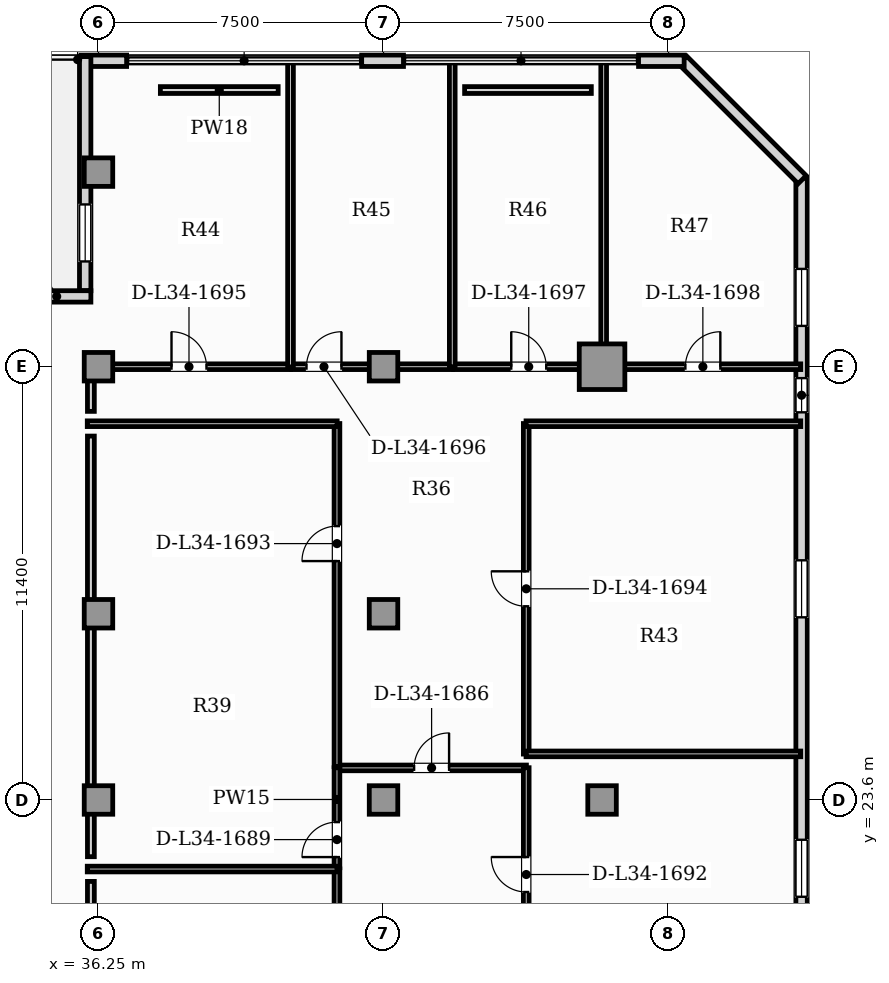
"""IFC4 building model, lengths in metres.
Left out: names, types, materials, properties, quantities, classifications, styles, units other than length and angle.
Written with IfcOpenShell. Run it as: python <this file> out.ifc"""

import sys

from ifc_helpers import new_model, si_unit, direction, frame, frame_2d, origin, origin_2d, place, context, subcontext, project, spatial, rectangle, hollow_rectangle, extrude, element, fill, save


model = new_model("IFC4")
c1 = context("Model", 3, precision=1e-05, world=origin(), true_north=direction((0.0, 1.0)))
c2 = subcontext(c1, "Body", "Model", "MODEL_VIEW")
j1 = project(units=[si_unit("LENGTHUNIT", "METRE"), si_unit("PLANEANGLEUNIT", "RADIAN")], contexts=[c1])
p1 = place(None, origin())
s1 = spatial("IfcSite", under=j1, at=p1, CompositionType="ELEMENT")
p2 = place(p1, origin())
s2 = spatial("IfcBuilding", under=s1, at=p2, CompositionType="ELEMENT")
p3 = place(p2, frame((0.0, 0.0, 140.15)))
s3 = spatial("IfcBuildingStorey", under=s2, at=p3, CompositionType="ELEMENT", Elevation=140.15)
p4 = place(p3, frame((49.5, 35.0, 0.0), z_axis=(0.0, 0.0, 1.0), x_axis=(1.0, 0.0, 0.0)))
e1 = element("IfcColumn", 1, at=p4, inside=s3, PredefinedType="USERDEFINED", context=c2, shape_type="SweptSolid", body=[
    extrude(hollow_rectangle(XDim=1.2, YDim=1.2, WallThickness=0.07, at=origin_2d()), origin(), (0.0, 0.0, 1.0), 5.05),
])
for number, where, z_axis, x_axis in (
    (2, (36.25, 23.6, 0.0), (0.0, 0.0, 1.0), (1.0, 0.0, 0.0)),
    (3, (43.75, 23.6, 0.0), (0.0, 0.0, 1.0), (1.0, 0.0, 0.0)),
    (4, (49.5, 23.6, 0.0), (0.0, 0.0, 1.0), (1.0, 0.0, 0.0)),
    (5, (36.25, 28.5, 0.0), (0.0, 0.0, 1.0), (1.0, 0.0, 0.0)),
    (6, (43.75, 28.5, 0.0), (0.0, 0.0, 1.0), (1.0, 0.0, 0.0)),
    (7, (36.25, 40.12, 0.0), (0.0, 0.0, 1.0), (1.0, 0.0, 0.0)),
    (8, (36.25, 35.0, 0.0), (0.0, 0.0, 1.0), (1.0, 0.0, 0.0)),
    (9, (43.75, 35.0, 0.0), (0.0, 0.0, 1.0), (1.0, 0.0, 0.0)),
):
    element("IfcColumn", number, at=place(p3, frame(where, z_axis=z_axis, x_axis=x_axis)), inside=s3, PredefinedType="COLUMN", context=c2, shape_type="SweptSolid", body=[
        extrude(rectangle(XDim=0.75, YDim=0.75, at=origin_2d()), origin(), (0.0, 0.0, 1.0), 5.05),
    ])
p5 = place(p3, frame((54.75, 3.24, 0.0), z_axis=(0.0, 0.0, 1.0), x_axis=(0.0, 1.0, 0.0)))
e10 = element("IfcWall", 10, at=p5, inside=s3, PredefinedType="SOLIDWALL", context=c2, shape_type="SweptSolid", body=[
    extrude(rectangle(XDim=36.72, YDim=0.3, at=frame_2d((18.36, 0.0))), origin(), (0.0, 0.0, 1.0), 4.83),
])
p6 = place(p5, frame((30.56, 0.0, 0.95)))
e11 = element("IfcOpeningElement", 11, at=p6, cuts=e10, PredefinedType="OPENING", context=c2, shape_type="SweptSolid", body=[
    extrude(rectangle(XDim=0.9, YDim=1.5, at=frame_2d((0.45, 0.75))), frame((0.0, 0.16, 0.0), z_axis=(0.0, -1.0, 0.0), x_axis=(1.0, 0.0, 0.0)), (0.0, 0.0, 1.0), 0.32),
])
p7 = place(p5, frame((10.095, 0.0, 0.95)))
e12 = element("IfcOpeningElement", 12, at=p7, cuts=e10, PredefinedType="OPENING", context=c2, shape_type="SweptSolid", body=[
    extrude(rectangle(XDim=0.9, YDim=1.5, at=frame_2d((0.45, 0.75))), frame((0.0, 0.16, 0.0), z_axis=(0.0, -1.0, 0.0), x_axis=(1.0, 0.0, 0.0)), (0.0, 0.0, 1.0), 0.32),
])
p8 = place(p5, frame((12.757, 0.0, 0.9)))
e13 = element("IfcOpeningElement", 13, at=p8, cuts=e10, PredefinedType="OPENING", context=c2, shape_type="SweptSolid", body=[
    extrude(rectangle(XDim=1.5, YDim=1.95, at=frame_2d((0.75, 0.975))), frame((0.0, 0.16, 0.0), z_axis=(0.0, -1.0, 0.0), x_axis=(1.0, 0.0, 0.0)), (0.0, 0.0, 1.0), 0.32),
])
p9 = place(p5, frame((17.813, 0.0, 0.9)))
e14 = element("IfcOpeningElement", 14, at=p9, cuts=e10, PredefinedType="OPENING", context=c2, shape_type="SweptSolid", body=[
    extrude(rectangle(XDim=1.5, YDim=1.95, at=frame_2d((0.75, 0.975))), frame((0.0, 0.16, 0.0), z_axis=(0.0, -1.0, 0.0), x_axis=(1.0, 0.0, 0.0)), (0.0, 0.0, 1.0), 0.32),
])
p10 = place(p5, frame((25.167, 0.0, 0.9)))
e15 = element("IfcOpeningElement", 15, at=p10, cuts=e10, PredefinedType="OPENING", context=c2, shape_type="SweptSolid", body=[
    extrude(rectangle(XDim=1.5, YDim=1.95, at=frame_2d((0.75, 0.975))), frame((0.0, 0.16, 0.0), z_axis=(0.0, -1.0, 0.0), x_axis=(1.0, 0.0, 0.0)), (0.0, 0.0, 1.0), 0.32),
])
p11 = place(p5, frame((32.834, 0.0, 0.9)))
e16 = element("IfcOpeningElement", 16, at=p11, cuts=e10, PredefinedType="OPENING", context=c2, shape_type="SweptSolid", body=[
    extrude(rectangle(XDim=1.5, YDim=1.95, at=frame_2d((0.75, 0.975))), frame((0.0, 0.16, 0.0), z_axis=(0.0, -1.0, 0.0), x_axis=(1.0, 0.0, 0.0)), (0.0, 0.0, 1.0), 0.32),
])
p12 = place(p3, frame((54.766, 39.922, 0.0), z_axis=(0.0, 0.0, 1.0), x_axis=(-0.707079321262, 0.707134240044, 0.0)))
e17 = element("IfcWall", 17, at=p12, inside=s3, PredefinedType="SOLIDWALL", context=c2, shape_type="SweptSolid", body=[
    extrude(rectangle(XDim=4.446, YDim=0.3, at=frame_2d((2.223, 0.0))), origin(), (0.0, 0.0, 1.0), 4.83),
])
p13 = place(p3, frame((51.66, 43.05, 0.0), z_axis=(0.0, 0.0, 1.0), x_axis=(-1.0, 0.0, 0.0)))
e18 = element("IfcWall", 18, at=p13, inside=s3, PredefinedType="SOLIDWALL", context=c2, shape_type="SweptSolid", body=[
    extrude(rectangle(XDim=1.2, YDim=0.3, at=frame_2d((0.6, 0.0))), origin(), (0.0, 0.0, 1.0), 4.83),
])
p14 = place(p3, frame((44.275, 43.05, 0.0), z_axis=(0.0, 0.0, 1.0), x_axis=(-1.0, 0.0, 0.0)))
e19 = element("IfcWall", 19, at=p14, inside=s3, PredefinedType="SOLIDWALL", context=c2, shape_type="SweptSolid", body=[
    extrude(rectangle(XDim=1.1, YDim=0.3, at=frame_2d((0.55, 0.0))), origin(), (0.0, 0.0, 1.0), 4.83),
])
p15 = place(p3, frame((36.99, 43.05, 0.0), z_axis=(0.0, 0.0, 1.0), x_axis=(-1.0, 0.0, 0.0)))
e20 = element("IfcWall", 20, at=p15, inside=s3, PredefinedType="SOLIDWALL", context=c2, shape_type="SweptSolid", body=[
    extrude(rectangle(XDim=1.2, YDim=0.3, at=frame_2d((0.6, 0.0))), origin(), (0.0, 0.0, 1.0), 4.83),
])
p16 = place(p3, frame((35.9, 43.16, 0.0), z_axis=(0.0, 0.0, 1.0), x_axis=(0.0, -1.0, 0.0)))
e21 = element("IfcWall", 21, at=p16, inside=s3, PredefinedType="SOLIDWALL", context=c2, shape_type="SweptSolid", body=[
    extrude(rectangle(XDim=6.16, YDim=0.3, at=frame_2d((3.08, 0.0))), origin(), (0.0, 0.0, 1.0), 4.83),
])
p17 = place(p16, frame((3.89, 0.0, 0.9)))
e22 = element("IfcOpeningElement", 22, at=p17, cuts=e21, PredefinedType="OPENING", context=c2, shape_type="SweptSolid", body=[
    extrude(rectangle(XDim=1.5, YDim=1.95, at=frame_2d((0.75, 0.975))), frame((0.0, 0.16, 0.0), z_axis=(0.0, -1.0, 0.0), x_axis=(1.0, 0.0, 0.0)), (0.0, 0.0, 1.0), 0.32),
])
p18 = place(p3, frame((34.25, 36.85, 0.0), z_axis=(0.0, 0.0, 1.0), x_axis=(1.0, 0.0, 0.0)))
e23 = element("IfcWall", 23, at=p18, inside=s3, PredefinedType="SOLIDWALL", context=c2, shape_type="SweptSolid", body=[
    extrude(rectangle(XDim=1.8, YDim=0.3, at=frame_2d((0.9, 0.0))), origin(), (0.0, 0.0, 1.0), 4.83),
])
p19 = place(p3, frame((42.52, 24.444, 0.0), z_axis=(0.0, 0.0, 1.0), x_axis=(1.0, 0.0, 0.0)))
e24 = element("IfcWall", 24, at=p19, inside=s3, PredefinedType="PARTITIONING", context=c2, shape_type="SweptSolid", body=[
    extrude(rectangle(XDim=4.99, YDim=0.15, at=frame_2d((2.495, 0.0))), origin(), (0.0, 0.0, 1.0), 4.83),
])
p20 = place(p19, frame((2.035, 0.0, 0.0)))
e25 = element("IfcOpeningElement", 25, at=p20, cuts=e24, PredefinedType="OPENING", context=c2, shape_type="SweptSolid", body=[
    extrude(rectangle(XDim=0.92, YDim=2.1, at=frame_2d((0.46, 1.05))), frame((0.0, 0.085, 0.0), z_axis=(0.0, -1.0, 0.0), x_axis=(1.0, 0.0, 0.0)), (0.0, 0.0, 1.0), 0.17),
])
p21 = place(p3, frame((42.525, 14.735, 0.0), z_axis=(0.0, 0.0, 1.0), x_axis=(0.0, 1.0, 0.0)))
e26 = element("IfcWall", 26, at=p21, inside=s3, PredefinedType="PARTITIONING", context=c2, shape_type="SweptSolid", body=[
    extrude(rectangle(XDim=7.052, YDim=0.15, at=frame_2d((3.526, 0.0))), origin(), (0.0, 0.0, 1.0), 4.83),
])
p22 = place(p21, frame((3.066, 0.0, 0.0)))
e27 = element("IfcOpeningElement", 27, at=p22, cuts=e26, PredefinedType="OPENING", context=c2, shape_type="SweptSolid", body=[
    extrude(rectangle(XDim=0.92, YDim=2.1, at=frame_2d((0.46, 1.05))), frame((0.0, 0.085, 0.0), z_axis=(0.0, -1.0, 0.0), x_axis=(1.0, 0.0, 0.0)), (0.0, 0.0, 1.0), 0.17),
])
p23 = place(p3, frame((42.525, 21.818, 0.0), z_axis=(0.0, 0.0, 1.0), x_axis=(0.0, 1.0, 0.0)))
e28 = element("IfcWall", 28, at=p23, inside=s3, PredefinedType="PARTITIONING", context=c2, shape_type="SweptSolid", body=[
    extrude(rectangle(XDim=2.632, YDim=0.15, at=frame_2d((1.316, 0.0))), origin(), (0.0, 0.0, 1.0), 4.83),
])
p24 = place(p23, frame((0.28, 0.0, 0.0)))
e29 = element("IfcOpeningElement", 29, at=p24, cuts=e28, PredefinedType="OPENING", context=c2, shape_type="SweptSolid", body=[
    extrude(rectangle(XDim=0.92, YDim=2.1, at=frame_2d((0.46, 1.05))), frame((0.0, 0.085, 0.0), z_axis=(0.0, -1.0, 0.0), x_axis=(1.0, 0.0, 0.0)), (0.0, 0.0, 1.0), 0.17),
])
p25 = place(p3, frame((47.505, 18.829, 0.0), z_axis=(0.0, 0.0, 1.0), x_axis=(0.0, 1.0, 0.0)))
e30 = element("IfcWall", 30, at=p25, inside=s3, PredefinedType="PARTITIONING", context=c2, shape_type="SweptSolid", body=[
    extrude(rectangle(XDim=5.621, YDim=0.15, at=frame_2d((2.81, 0.0))), origin(), (0.0, 0.0, 1.0), 4.377),
])
p26 = place(p25, frame((2.35, 0.0, 0.0)))
e31 = element("IfcOpeningElement", 31, at=p26, cuts=e30, PredefinedType="OPENING", context=c2, shape_type="SweptSolid", body=[
    extrude(rectangle(XDim=0.92, YDim=2.1, at=frame_2d((0.46, 1.05))), frame((0.0, 0.085, 0.0), z_axis=(0.0, -1.0, 0.0), x_axis=(1.0, 0.0, 0.0)), (0.0, 0.0, 1.0), 0.17),
])
p27 = place(p3, frame((42.525, 24.479, 0.0), z_axis=(0.0, 0.0, 1.0), x_axis=(0.0, 1.0, 0.0)))
e32 = element("IfcWall", 32, at=p27, inside=s3, PredefinedType="PARTITIONING", context=c2, shape_type="SweptSolid", body=[
    extrude(rectangle(XDim=9.026, YDim=0.15, at=frame_2d((4.513, 0.0))), origin(), (0.0, 0.0, 1.0), 4.83),
])
p28 = place(p27, frame((5.407, 0.0, 0.0)))
e33 = element("IfcOpeningElement", 33, at=p28, cuts=e32, PredefinedType="OPENING", context=c2, shape_type="SweptSolid", body=[
    extrude(rectangle(XDim=0.92, YDim=2.1, at=frame_2d((0.46, 1.05))), frame((0.0, 0.085, 0.0), z_axis=(0.0, -1.0, 0.0), x_axis=(1.0, 0.0, 0.0)), (0.0, 0.0, 1.0), 0.17),
])
p29 = place(p3, frame((35.955, 33.5, 0.0), z_axis=(0.0, 0.0, 1.0), x_axis=(1.0, 0.0, 0.0)))
e34 = element("IfcWall", 34, at=p29, inside=s3, PredefinedType="PARTITIONING", context=c2, shape_type="SweptSolid", body=[
    extrude(rectangle(XDim=6.575, YDim=0.15, at=frame_2d((3.288, 0.0))), origin(), (0.0, 0.0, 1.0), 4.83),
])
p30 = place(p3, frame((47.505, 24.808, 0.0), z_axis=(0.0, 0.0, 1.0), x_axis=(0.0, 1.0, 0.0)))
e35 = element("IfcWall", 35, at=p30, inside=s3, PredefinedType="PARTITIONING", context=c2, shape_type="SweptSolid", body=[
    extrude(rectangle(XDim=8.697, YDim=0.15, at=frame_2d((4.349, 0.0))), origin(), (0.0, 0.0, 1.0), 4.377),
])
p31 = place(p30, frame((3.889, 0.0, 0.0)))
e36 = element("IfcOpeningElement", 36, at=p31, cuts=e35, PredefinedType="OPENING", context=c2, shape_type="SweptSolid", body=[
    extrude(rectangle(XDim=0.92, YDim=2.1, at=frame_2d((0.46, 1.05))), frame((0.0, 0.085, 0.0), z_axis=(0.0, -1.0, 0.0), x_axis=(1.0, 0.0, 0.0)), (0.0, 0.0, 1.0), 0.17),
])
p32 = place(p3, frame((47.5, 33.5, 0.0), z_axis=(0.0, 0.0, 1.0), x_axis=(1.0, 0.0, 0.0)))
e37 = element("IfcWall", 37, at=p32, inside=s3, PredefinedType="PARTITIONING", context=c2, shape_type="SweptSolid", body=[
    extrude(rectangle(XDim=7.228, YDim=0.15, at=frame_2d((3.614, 0.0))), origin(), (0.0, 0.0, 1.0), 4.83),
])
p33 = place(p3, frame((35.955, 35.0, 0.0), z_axis=(0.0, 0.0, 1.0), x_axis=(1.0, 0.0, 0.0)))
e38 = element("IfcWall", 38, at=p33, inside=s3, PredefinedType="PARTITIONING", context=c2, shape_type="SweptSolid", body=[
    extrude(rectangle(XDim=5.353, YDim=0.15, at=frame_2d((2.676, 0.0))), origin(), (0.0, 0.0, 1.0), 4.213),
])
p34 = place(p33, frame((2.216, 0.0, 0.0)))
e39 = element("IfcOpeningElement", 39, at=p34, cuts=e38, PredefinedType="OPENING", context=c2, shape_type="SweptSolid", body=[
    extrude(rectangle(XDim=0.92, YDim=2.1, at=frame_2d((0.46, 1.05))), frame((0.0, 0.085, 0.0), z_axis=(0.0, -1.0, 0.0), x_axis=(1.0, 0.0, 0.0)), (0.0, 0.0, 1.0), 0.17),
])
p35 = place(p3, frame((41.338, 35.0, 0.0), z_axis=(0.0, 0.0, 1.0), x_axis=(1.0, 0.0, 0.0)))
e40 = element("IfcWall", 40, at=p35, inside=s3, PredefinedType="PARTITIONING", context=c2, shape_type="SweptSolid", body=[
    extrude(rectangle(XDim=4.226, YDim=0.15, at=frame_2d((2.113, 0.0))), origin(), (0.0, 0.0, 1.0), 4.213),
])
p36 = place(p35, frame((0.385, 0.0, 0.0)))
e41 = element("IfcOpeningElement", 41, at=p36, cuts=e40, PredefinedType="OPENING", context=c2, shape_type="SweptSolid", body=[
    extrude(rectangle(XDim=0.92, YDim=2.1, at=frame_2d((0.46, 1.05))), frame((0.0, 0.085, 0.0), z_axis=(0.0, -1.0, 0.0), x_axis=(1.0, 0.0, 0.0)), (0.0, 0.0, 1.0), 0.17),
])
p37 = place(p3, frame((45.594, 35.0, 0.0), z_axis=(0.0, 0.0, 1.0), x_axis=(1.0, 0.0, 0.0)))
e42 = element("IfcWall", 42, at=p37, inside=s3, PredefinedType="PARTITIONING", context=c2, shape_type="SweptSolid", body=[
    extrude(rectangle(XDim=3.954, YDim=0.15, at=frame_2d((1.977, 0.0))), origin(), (0.0, 0.0, 1.0), 4.213),
])
p38 = place(p37, frame((1.517, 0.0, 0.0)))
e43 = element("IfcOpeningElement", 43, at=p38, cuts=e42, PredefinedType="OPENING", context=c2, shape_type="SweptSolid", body=[
    extrude(rectangle(XDim=0.92, YDim=2.1, at=frame_2d((0.46, 1.05))), frame((0.0, 0.085, 0.0), z_axis=(0.0, -1.0, 0.0), x_axis=(1.0, 0.0, 0.0)), (0.0, 0.0, 1.0), 0.17),
])
p39 = place(p3, frame((49.578, 35.0, 0.0), z_axis=(0.0, 0.0, 1.0), x_axis=(1.0, 0.0, 0.0)))
e44 = element("IfcWall", 44, at=p39, inside=s3, PredefinedType="PARTITIONING", context=c2, shape_type="SweptSolid", body=[
    extrude(rectangle(XDim=5.15, YDim=0.15, at=frame_2d((2.575, 0.0))), origin(), (0.0, 0.0, 1.0), 4.83),
])
p40 = place(p39, frame((2.115, 0.0, 0.0)))
e45 = element("IfcOpeningElement", 45, at=p40, cuts=e44, PredefinedType="OPENING", context=c2, shape_type="SweptSolid", body=[
    extrude(rectangle(XDim=0.92, YDim=2.1, at=frame_2d((0.46, 1.05))), frame((0.0, 0.085, 0.0), z_axis=(0.0, -1.0, 0.0), x_axis=(1.0, 0.0, 0.0)), (0.0, 0.0, 1.0), 0.17),
])
p41 = place(p3, frame((35.955, 21.783, 0.0), z_axis=(0.0, 0.0, 1.0), x_axis=(1.0, 0.0, 0.0)))
e46 = element("IfcWall", 46, at=p41, inside=s3, PredefinedType="PARTITIONING", context=c2, shape_type="SweptSolid", body=[
    extrude(rectangle(XDim=6.575, YDim=0.15, at=frame_2d((3.288, 0.0))), origin(), (0.0, 0.0, 1.0), 4.83),
])
p42 = place(p3, frame((47.5, 24.813, 0.0), z_axis=(0.0, 0.0, 1.0), x_axis=(1.0, 0.0, 0.0)))
e47 = element("IfcWall", 47, at=p42, inside=s3, PredefinedType="PARTITIONING", context=c2, shape_type="SweptSolid", body=[
    extrude(rectangle(XDim=7.228, YDim=0.15, at=frame_2d((3.614, 0.0))), origin(), (0.0, 0.0, 1.0), 4.83),
])
for number, where, z_axis, x_axis in (
    (48, (41.303, 34.995, 0.0), (0.0, 0.0, 1.0), (0.0, 1.0, 0.0)),
    (49, (45.559, 34.995, 0.0), (0.0, 0.0, 1.0), (0.0, 1.0, 0.0)),
    (50, (49.542, 34.995, 0.0), (0.0, 0.0, 1.0), (0.0, 1.0, 0.0)),
):
    element("IfcWall", number, at=place(p3, frame(where, z_axis=z_axis, x_axis=x_axis)), inside=s3, PredefinedType="PARTITIONING", context=c2, shape_type="SweptSolid", body=[
        extrude(rectangle(XDim=8.037, YDim=0.15, at=frame_2d((4.019, 0.0))), origin(), (0.0, 0.0, 1.0), 4.83),
    ])
p43 = place(p3, frame((36.05, 33.825, 0.0), z_axis=(0.0, 0.0, 1.0), x_axis=(0.0, 1.0, 0.0)))
e51 = element("IfcWall", 51, at=p43, inside=s3, PredefinedType="PARTITIONING", context=c2, shape_type="SweptSolid", body=[
    extrude(rectangle(XDim=0.85, YDim=0.18, at=frame_2d((0.425, 0.0))), origin(), (0.0, 0.0, 1.0), 4.83),
])
p44 = place(p3, frame((36.05, 17.87, 0.0), z_axis=(0.0, 0.0, 1.0), x_axis=(0.0, 1.0, 0.0)))
e52 = element("IfcWall", 52, at=p44, inside=s3, PredefinedType="PARTITIONING", context=c2, shape_type="SweptSolid", body=[
    extrude(rectangle(XDim=3.588, YDim=0.18, at=frame_2d((1.794, 0.0))), origin(), (0.0, 0.0, 1.0), 4.377),
])
p45 = place(p3, frame((36.05, 22.108, 0.0), z_axis=(0.0, 0.0, 1.0), x_axis=(0.0, 1.0, 0.0)))
e53 = element("IfcWall", 53, at=p45, inside=s3, PredefinedType="PARTITIONING", context=c2, shape_type="SweptSolid", body=[
    extrude(rectangle(XDim=11.067, YDim=0.18, at=frame_2d((5.534, 0.0))), origin(), (0.0, 0.0, 1.0), 4.377),
])
p46 = place(p3, frame((37.878, 42.28, 0.0), z_axis=(0.0, 0.0, 1.0), x_axis=(1.0, 0.0, 0.0)))
e54 = element("IfcWall", 54, at=p46, inside=s3, PredefinedType="PARTITIONING", context=c2, shape_type="SweptSolid", body=[
    extrude(rectangle(XDim=3.099, YDim=0.18, at=frame_2d((1.55, 0.0))), origin(), (0.0, 0.0, 1.0), 4.83),
])
p47 = place(p3, frame((45.884, 42.28, 0.0), z_axis=(0.0, 0.0, 1.0), x_axis=(1.0, 0.0, 0.0)))
e55 = element("IfcWall", 55, at=p47, inside=s3, PredefinedType="PARTITIONING", context=c2, shape_type="SweptSolid", body=[
    extrude(rectangle(XDim=3.334, YDim=0.18, at=frame_2d((1.667, 0.0))), origin(), (0.0, 0.0, 1.0), 4.83),
])
p48 = place(p6, origin())
e56 = element("IfcWindow", 56, at=p48, inside=s3, PartitioningType="SINGLE_PANEL", PredefinedType="WINDOW", context=c2, shape_type="SweptSolid", body=[
    extrude(rectangle(XDim=0.9, YDim=1.5, at=frame_2d((0.45, 0.75))), frame((0.0, 0.03, 0.0), z_axis=(0.0, -1.0, 0.0), x_axis=(1.0, 0.0, 0.0)), (0.0, 0.0, 1.0), 0.06),
])
fill(e11, e56)
p49 = place(p9, origin())
e57 = element("IfcWindow", 57, at=p49, inside=s3, PartitioningType="SINGLE_PANEL", PredefinedType="WINDOW", context=c2, shape_type="SweptSolid", body=[
    extrude(rectangle(XDim=1.5, YDim=1.95, at=frame_2d((0.75, 0.975))), frame((0.0, 0.03, 0.0), z_axis=(0.0, -1.0, 0.0), x_axis=(1.0, 0.0, 0.0)), (0.0, 0.0, 1.0), 0.06),
])
fill(e14, e57)
p50 = place(p10, origin())
e58 = element("IfcWindow", 58, at=p50, inside=s3, PartitioningType="SINGLE_PANEL", PredefinedType="WINDOW", context=c2, shape_type="SweptSolid", body=[
    extrude(rectangle(XDim=1.5, YDim=1.95, at=frame_2d((0.75, 0.975))), frame((0.0, 0.03, 0.0), z_axis=(0.0, -1.0, 0.0), x_axis=(1.0, 0.0, 0.0)), (0.0, 0.0, 1.0), 0.06),
])
fill(e15, e58)
p51 = place(p17, origin())
e59 = element("IfcWindow", 59, at=p51, inside=s3, PartitioningType="SINGLE_PANEL", PredefinedType="WINDOW", context=c2, shape_type="SweptSolid", body=[
    extrude(rectangle(XDim=1.5, YDim=1.95, at=frame_2d((0.75, 0.975))), frame((0.0, 0.03, 0.0), z_axis=(0.0, -1.0, 0.0), x_axis=(1.0, 0.0, 0.0)), (0.0, 0.0, 1.0), 0.06),
])
fill(e22, e59)
p52 = place(p11, origin())
e60 = element("IfcWindow", 60, at=p52, inside=s3, PartitioningType="SINGLE_PANEL", PredefinedType="WINDOW", context=c2, shape_type="SweptSolid", body=[
    extrude(rectangle(XDim=1.5, YDim=1.95, at=frame_2d((0.75, 0.975))), frame((0.0, 0.03, 0.0), z_axis=(0.0, -1.0, 0.0), x_axis=(1.0, 0.0, 0.0)), (0.0, 0.0, 1.0), 0.06),
])
fill(e16, e60)
p53 = place(p20, origin())
e61 = element("IfcDoor", 61, at=p53, inside=s3, OperationType="SINGLE_SWING_RIGHT", PredefinedType="DOOR", context=c2, shape_type="SweptSolid", body=[
    extrude(rectangle(XDim=0.92, YDim=2.1, at=frame_2d((0.46, 1.05))), frame((0.0, 0.025, 0.0), z_axis=(0.0, -1.0, 0.0), x_axis=(1.0, 0.0, 0.0)), (0.0, 0.0, 1.0), 0.05),
])
fill(e25, e61)
p54 = place(p24, origin())
e62 = element("IfcDoor", 62, at=p54, inside=s3, OperationType="SINGLE_SWING_LEFT", PredefinedType="DOOR", context=c2, shape_type="SweptSolid", body=[
    extrude(rectangle(XDim=0.92, YDim=2.1, at=frame_2d((0.46, 1.05))), frame((0.0, 0.025, 0.0), z_axis=(0.0, -1.0, 0.0), x_axis=(1.0, 0.0, 0.0)), (0.0, 0.0, 1.0), 0.05),
])
fill(e29, e62)
p55 = place(p26, origin())
e63 = element("IfcDoor", 63, at=p55, inside=s3, OperationType="SINGLE_SWING_RIGHT", PredefinedType="DOOR", context=c2, shape_type="SweptSolid", body=[
    extrude(rectangle(XDim=0.92, YDim=2.1, at=frame_2d((0.46, 1.05))), frame((0.0, 0.025, 0.0), z_axis=(0.0, -1.0, 0.0), x_axis=(1.0, 0.0, 0.0)), (0.0, 0.0, 1.0), 0.05),
])
fill(e31, e63)
p56 = place(p28, origin())
e64 = element("IfcDoor", 64, at=p56, inside=s3, OperationType="SINGLE_SWING_LEFT", PredefinedType="DOOR", context=c2, shape_type="SweptSolid", body=[
    extrude(rectangle(XDim=0.92, YDim=2.1, at=frame_2d((0.46, 1.05))), frame((0.0, 0.025, 0.0), z_axis=(0.0, -1.0, 0.0), x_axis=(1.0, 0.0, 0.0)), (0.0, 0.0, 1.0), 0.05),
])
fill(e33, e64)
p57 = place(p31, origin())
e65 = element("IfcDoor", 65, at=p57, inside=s3, OperationType="SINGLE_SWING_RIGHT", PredefinedType="DOOR", context=c2, shape_type="SweptSolid", body=[
    extrude(rectangle(XDim=0.92, YDim=2.1, at=frame_2d((0.46, 1.05))), frame((0.0, 0.025, 0.0), z_axis=(0.0, -1.0, 0.0), x_axis=(1.0, 0.0, 0.0)), (0.0, 0.0, 1.0), 0.05),
])
fill(e36, e65)
p58 = place(p34, origin())
e66 = element("IfcDoor", 66, at=p58, inside=s3, OperationType="SINGLE_SWING_LEFT", PredefinedType="DOOR", context=c2, shape_type="SweptSolid", body=[
    extrude(rectangle(XDim=0.92, YDim=2.1, at=frame_2d((0.46, 1.05))), frame((0.0, 0.025, 0.0), z_axis=(0.0, -1.0, 0.0), x_axis=(1.0, 0.0, 0.0)), (0.0, 0.0, 1.0), 0.05),
])
fill(e39, e66)
p59 = place(p36, origin())
e67 = element("IfcDoor", 67, at=p59, inside=s3, OperationType="SINGLE_SWING_RIGHT", PredefinedType="DOOR", context=c2, shape_type="SweptSolid", body=[
    extrude(rectangle(XDim=0.92, YDim=2.1, at=frame_2d((0.46, 1.05))), frame((0.0, 0.025, 0.0), z_axis=(0.0, -1.0, 0.0), x_axis=(1.0, 0.0, 0.0)), (0.0, 0.0, 1.0), 0.05),
])
fill(e41, e67)
p60 = place(p38, origin())
e68 = element("IfcDoor", 68, at=p60, inside=s3, OperationType="SINGLE_SWING_LEFT", PredefinedType="DOOR", context=c2, shape_type="SweptSolid", body=[
    extrude(rectangle(XDim=0.92, YDim=2.1, at=frame_2d((0.46, 1.05))), frame((0.0, 0.025, 0.0), z_axis=(0.0, -1.0, 0.0), x_axis=(1.0, 0.0, 0.0)), (0.0, 0.0, 1.0), 0.05),
])
fill(e43, e68)
p61 = place(p40, origin())
e69 = element("IfcDoor", 69, at=p61, inside=s3, OperationType="SINGLE_SWING_RIGHT", PredefinedType="DOOR", context=c2, shape_type="SweptSolid", body=[
    extrude(rectangle(XDim=0.92, YDim=2.1, at=frame_2d((0.46, 1.05))), frame((0.0, 0.025, 0.0), z_axis=(0.0, -1.0, 0.0), x_axis=(1.0, 0.0, 0.0)), (0.0, 0.0, 1.0), 0.05),
])
fill(e45, e69)
save(model, sys.argv[1])
